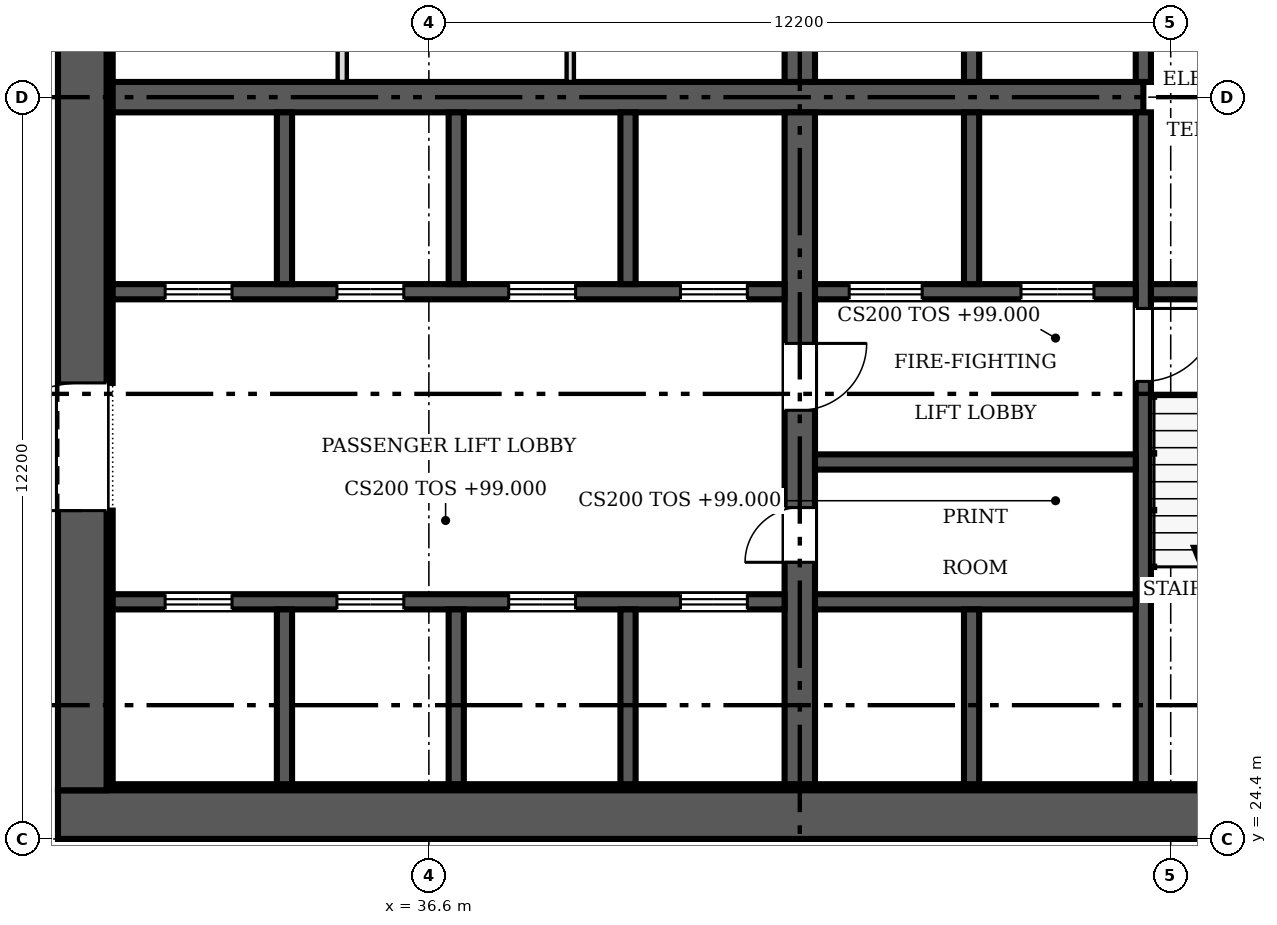
"""IFC4 building model, lengths in metres.
Left out: names, types, materials, properties, quantities, classifications, styles, units other than length and angle.
Written with IfcOpenShell. Run it as: python <this file> out.ifc"""

import sys

from ifc_helpers import new_model, si_unit, direction, frame, frame_2d, origin, place, context, subcontext, project, spatial, rectangle, extrude, source, transform, mapped, element, fill, save


model = new_model("IFC4")
c1 = context("Model", 3, precision=1e-05, world=origin(), true_north=direction((0.0, 1.0)))
c2 = subcontext(c1, "Body", "Model", "MODEL_VIEW")
j1 = project(units=[si_unit("LENGTHUNIT", "METRE"), si_unit("PLANEANGLEUNIT", "RADIAN")], contexts=[c1])
p1 = place(None, origin())
s1 = spatial("IfcSite", under=j1, at=p1, CompositionType="ELEMENT")
p2 = place(p1, origin())
s2 = spatial("IfcBuilding", under=s1, at=p2, CompositionType="ELEMENT")
p3 = place(p2, frame((0.0, 0.0, 99.0)))
s3 = spatial("IfcBuildingStorey", under=s2, at=p3, CompositionType="ELEMENT", Elevation=99.0)
p4 = place(p3, frame((54.9, 24.8, 0.0), z_axis=(0.0, 0.0, 1.0), x_axis=(-1.0, 0.0, 0.0)))
e1 = element("IfcWall", 1, at=p4, inside=s3, PredefinedType="SHEAR", context=c2, shape_type="SweptSolid", body=[
    extrude(rectangle(XDim=24.4, YDim=0.8, at=frame_2d((12.2, 0.0))), origin(), (0.0, 0.0, 1.0), 3.8),
])
m1 = source(origin(), c2, "Body", "SweptSolid", [
    extrude(rectangle(XDim=1.2, YDim=2.1, at=frame_2d((0.6, 1.05))), frame((0.0, 0.41, 0.0), z_axis=(0.0, -1.0, 0.0), x_axis=(1.0, 0.0, 0.0)), (0.0, 0.0, 1.0), 0.82),
])
p5 = place(p4, frame((1.5, 0.0, 0.0)))
e2 = element("IfcOpeningElement", 2, at=p5, cuts=e1, PredefinedType="OPENING", context=c2, shape_type="MappedRepresentation", body=[
    mapped(m1, transform((0.0, 0.0, 0.0), scale=1.0)),
])
p6 = place(p3, frame((30.9, 25.2, 0.0), z_axis=(0.0, 0.0, 1.0), x_axis=(0.0, 1.0, 0.0)))
e3 = element("IfcWall", 3, at=p6, inside=s3, PredefinedType="SHEAR", context=c2, shape_type="SweptSolid", body=[
    extrude(rectangle(XDim=22.8, YDim=0.8, at=frame_2d((11.4, 0.0))), origin(), (0.0, 0.0, 1.0), 3.8),
])
m2 = source(origin(), c2, "Body", "SweptSolid", [
    extrude(rectangle(XDim=2.1, YDim=2.4, at=frame_2d((1.05, 1.2))), frame((0.0, 0.41, 0.0), z_axis=(0.0, -1.0, 0.0), x_axis=(1.0, 0.0, 0.0)), (0.0, 0.0, 1.0), 0.82),
])
p7 = place(p6, frame((4.6, 0.0, 0.0)))
e4 = element("IfcOpeningElement", 4, at=p7, cuts=e3, PredefinedType="OPENING", context=c2, shape_type="MappedRepresentation", body=[
    mapped(m2, transform((0.0, 0.0, 0.0), scale=1.0)),
])
p8 = place(p6, frame((16.1, 0.0, 0.0)))
e5 = element("IfcOpeningElement", 5, at=p8, cuts=e3, PredefinedType="OPENING", context=c2, shape_type="MappedRepresentation", body=[
    mapped(m2, transform((0.0, 0.0, 0.0), scale=1.0)),
])
p9 = place(p3, frame((31.3, 25.25, 0.0), z_axis=(0.0, 0.0, 1.0), x_axis=(1.0, 0.0, 0.0)))
e6 = element("IfcWall", 6, at=p9, inside=s3, PredefinedType="SOLIDWALL", context=c2, shape_type="SweptSolid", body=[
    extrude(rectangle(XDim=20.9, YDim=0.1, at=frame_2d((10.45, 0.0))), origin(), (0.0, 0.0, 1.0), 3.8),
])
p10 = place(p3, frame((31.35, 25.3, 0.0), z_axis=(0.0, 0.0, 1.0), x_axis=(0.0, 1.0, 0.0)))
e7 = element("IfcWall", 7, at=p10, inside=s3, PredefinedType="SOLIDWALL", context=c2, shape_type="SweptSolid", body=[
    extrude(rectangle(XDim=4.5, YDim=0.1, at=frame_2d((2.25, 0.0))), origin(), (0.0, 0.0, 1.0), 3.8),
])
p11 = place(p3, frame((31.35, 31.9, 0.0), z_axis=(0.0, 0.0, 1.0), x_axis=(0.0, 1.0, 0.0)))
e8 = element("IfcWall", 8, at=p11, inside=s3, PredefinedType="SOLIDWALL", context=c2, shape_type="SweptSolid", body=[
    extrude(rectangle(XDim=9.4, YDim=0.1, at=frame_2d((4.7, 0.0))), origin(), (0.0, 0.0, 1.0), 3.8),
])
p12 = place(p3, frame((31.4, 36.6, 0.0), z_axis=(0.0, 0.0, 1.0), x_axis=(1.0, 0.0, 0.0)))
e9 = element("IfcWall", 9, at=p12, inside=s3, PredefinedType="SHEAR", context=c2, shape_type="SweptSolid", body=[
    extrude(rectangle(XDim=16.95, YDim=0.5, at=frame_2d((8.475, 0.0))), origin(), (0.0, 0.0, 1.0), 3.8),
])
p13 = place(p3, frame((42.7, 36.35, 0.0), z_axis=(0.0, 0.0, 1.0), x_axis=(0.0, -1.0, 0.0)))
e10 = element("IfcWall", 10, at=p13, inside=s3, PredefinedType="SHEAR", context=c2, shape_type="SweptSolid", body=[
    extrude(rectangle(XDim=11.05, YDim=0.5, at=frame_2d((5.525, 0.0))), origin(), (0.0, 0.0, 1.0), 3.8),
])
m3 = source(origin(), c2, "Body", "SweptSolid", [
    extrude(rectangle(XDim=0.9, YDim=2.1, at=frame_2d((0.45, 1.05))), frame((0.0, 0.26, 0.0), z_axis=(0.0, -1.0, 0.0), x_axis=(1.0, 0.0, 0.0)), (0.0, 0.0, 1.0), 0.52),
])
p14 = place(p13, frame((6.5, 0.0, 0.0)))
e11 = element("IfcOpeningElement", 11, at=p14, cuts=e10, PredefinedType="OPENING", context=c2, shape_type="MappedRepresentation", body=[
    mapped(m3, transform((0.0, 0.0, 0.0), scale=1.0)),
])
m4 = source(origin(), c2, "Body", "SweptSolid", [
    extrude(rectangle(XDim=1.1, YDim=2.1, at=frame_2d((0.55, 1.05))), frame((0.0, 0.26, 0.0), z_axis=(0.0, -1.0, 0.0), x_axis=(1.0, 0.0, 0.0)), (0.0, 0.0, 1.0), 0.52),
])
p15 = place(p13, frame((3.8, 0.0, 0.0)))
e12 = element("IfcOpeningElement", 12, at=p15, cuts=e10, PredefinedType="OPENING", context=c2, shape_type="MappedRepresentation", body=[
    mapped(m4, transform((0.0, 0.0, 0.0), scale=1.0)),
])
p16 = place(p3, frame((42.7, 36.85, 0.0), z_axis=(0.0, 0.0, 1.0), x_axis=(0.0, 1.0, 0.0)))
e13 = element("IfcWall", 13, at=p16, inside=s3, PredefinedType="SHEAR", context=c2, shape_type="SweptSolid", body=[
    extrude(rectangle(XDim=2.95, YDim=0.5, at=frame_2d((1.475, 0.0))), origin(), (0.0, 0.0, 1.0), 3.8),
])
p17 = place(p3, frame((48.35, 36.35, 0.0), z_axis=(0.0, 0.0, 1.0), x_axis=(0.0, -1.0, 0.0)))
e14 = element("IfcWall", 14, at=p17, inside=s3, PredefinedType="SOLIDWALL", context=c2, shape_type="SweptSolid", body=[
    extrude(rectangle(XDim=11.05, YDim=0.25, at=frame_2d((5.525, 0.0))), origin(), (0.0, 0.0, 1.0), 3.8),
])
m5 = source(origin(), c2, "Body", "SweptSolid", [
    extrude(rectangle(XDim=1.2, YDim=2.1, at=frame_2d((0.6, 1.05))), frame((0.0, 0.135, 0.0), z_axis=(0.0, -1.0, 0.0), x_axis=(1.0, 0.0, 0.0)), (0.0, 0.0, 1.0), 0.27),
])
p18 = place(p17, frame((3.225, 0.0, 0.0)))
e15 = element("IfcOpeningElement", 15, at=p18, cuts=e14, PredefinedType="OPENING", context=c2, shape_type="MappedRepresentation", body=[
    mapped(m5, transform((0.0, 0.0, 0.0), scale=1.0)),
])
p19 = place(p3, frame((48.35, 47.9, 0.0), z_axis=(0.0, 0.0, 1.0), x_axis=(0.0, -1.0, 0.0)))
e16 = element("IfcWall", 16, at=p19, inside=s3, PredefinedType="SOLIDWALL", context=c2, shape_type="SweptSolid", body=[
    extrude(rectangle(XDim=11.05, YDim=0.25, at=frame_2d((5.525, 0.0))), origin(), (0.0, 0.0, 1.0), 3.8),
])
p20 = place(p19, frame((6.625, 0.0, 0.0)))
e17 = element("IfcOpeningElement", 17, at=p20, cuts=e16, PredefinedType="OPENING", context=c2, shape_type="MappedRepresentation", body=[
    mapped(m5, transform((0.0, 0.0, 0.0), scale=1.0)),
])
p21 = place(p3, frame((42.45, 33.4, 0.0), z_axis=(0.0, 0.0, 1.0), x_axis=(-1.0, 0.0, 0.0)))
e18 = element("IfcWall", 18, at=p21, inside=s3, PredefinedType="SOLIDWALL", context=c2, shape_type="SweptSolid", body=[
    extrude(rectangle(XDim=11.05, YDim=0.25, at=frame_2d((5.525, 0.0))), origin(), (0.0, 0.0, 1.0), 3.8),
])
m6 = source(origin(), c2, "Body", "SweptSolid", [
    extrude(rectangle(XDim=1.1, YDim=2.1, at=frame_2d((0.55, 1.05))), frame((0.0, 0.135, 0.0), z_axis=(0.0, -1.0, 0.0), x_axis=(1.0, 0.0, 0.0)), (0.0, 0.0, 1.0), 0.27),
])
p22 = place(p21, frame((9.087, 0.0, 0.0)))
e19 = element("IfcOpeningElement", 19, at=p22, cuts=e18, PredefinedType="OPENING", context=c2, shape_type="MappedRepresentation", body=[
    mapped(m6, transform((0.0, 0.0, 0.0), scale=1.0)),
])
p23 = place(p21, frame((6.262, 0.0, 0.0)))
e20 = element("IfcOpeningElement", 20, at=p23, cuts=e18, PredefinedType="OPENING", context=c2, shape_type="MappedRepresentation", body=[
    mapped(m6, transform((0.0, 0.0, 0.0), scale=1.0)),
])
p24 = place(p21, frame((3.438, 0.0, 0.0)))
e21 = element("IfcOpeningElement", 21, at=p24, cuts=e18, PredefinedType="OPENING", context=c2, shape_type="MappedRepresentation", body=[
    mapped(m6, transform((0.0, 0.0, 0.0), scale=1.0)),
])
p25 = place(p21, frame((0.613, 0.0, 0.0)))
e22 = element("IfcOpeningElement", 22, at=p25, cuts=e18, PredefinedType="OPENING", context=c2, shape_type="MappedRepresentation", body=[
    mapped(m6, transform((0.0, 0.0, 0.0), scale=1.0)),
])
p26 = place(p3, frame((48.225, 33.4, 0.0), z_axis=(0.0, 0.0, 1.0), x_axis=(-1.0, 0.0, 0.0)))
e23 = element("IfcWall", 23, at=p26, inside=s3, PredefinedType="SOLIDWALL", context=c2, shape_type="SweptSolid", body=[
    extrude(rectangle(XDim=5.275, YDim=0.25, at=frame_2d((2.638, 0.0))), origin(), (0.0, 0.0, 1.0), 3.8),
])
p27 = place(p26, frame((3.512, 0.0, 0.0)))
e24 = element("IfcOpeningElement", 24, at=p27, cuts=e23, PredefinedType="OPENING", context=c2, shape_type="MappedRepresentation", body=[
    mapped(m5, transform((0.0, 0.0, 0.0), scale=1.0)),
])
p28 = place(p26, frame((0.688, 0.0, 0.0)))
e25 = element("IfcOpeningElement", 25, at=p28, cuts=e23, PredefinedType="OPENING", context=c2, shape_type="MappedRepresentation", body=[
    mapped(m5, transform((0.0, 0.0, 0.0), scale=1.0)),
])
p29 = place(p3, frame((48.475, 33.4, 0.0), z_axis=(0.0, 0.0, 1.0), x_axis=(1.0, 0.0, 0.0)))
e26 = element("IfcWall", 26, at=p29, inside=s3, PredefinedType="SOLIDWALL", context=c2, shape_type="SweptSolid", body=[
    extrude(rectangle(XDim=3.525, YDim=0.25, at=frame_2d((1.762, 0.0))), origin(), (0.0, 0.0, 1.0), 3.8),
])
p30 = place(p3, frame((31.4, 28.3, 0.0), z_axis=(0.0, 0.0, 1.0), x_axis=(1.0, 0.0, 0.0)))
e27 = element("IfcWall", 27, at=p30, inside=s3, PredefinedType="SOLIDWALL", context=c2, shape_type="SweptSolid", body=[
    extrude(rectangle(XDim=11.05, YDim=0.25, at=frame_2d((5.525, 0.0))), origin(), (0.0, 0.0, 1.0), 3.8),
])
p31 = place(p30, frame((0.863, 0.0, 0.0)))
e28 = element("IfcOpeningElement", 28, at=p31, cuts=e27, PredefinedType="OPENING", context=c2, shape_type="MappedRepresentation", body=[
    mapped(m6, transform((0.0, 0.0, 0.0), scale=1.0)),
])
p32 = place(p30, frame((3.688, 0.0, 0.0)))
e29 = element("IfcOpeningElement", 29, at=p32, cuts=e27, PredefinedType="OPENING", context=c2, shape_type="MappedRepresentation", body=[
    mapped(m6, transform((0.0, 0.0, 0.0), scale=1.0)),
])
p33 = place(p30, frame((6.512, 0.0, 0.0)))
e30 = element("IfcOpeningElement", 30, at=p33, cuts=e27, PredefinedType="OPENING", context=c2, shape_type="MappedRepresentation", body=[
    mapped(m6, transform((0.0, 0.0, 0.0), scale=1.0)),
])
p34 = place(p30, frame((9.337, 0.0, 0.0)))
e31 = element("IfcOpeningElement", 31, at=p34, cuts=e27, PredefinedType="OPENING", context=c2, shape_type="MappedRepresentation", body=[
    mapped(m6, transform((0.0, 0.0, 0.0), scale=1.0)),
])
p35 = place(p3, frame((42.95, 28.3, 0.0), z_axis=(0.0, 0.0, 1.0), x_axis=(1.0, 0.0, 0.0)))
e32 = element("IfcWall", 32, at=p35, inside=s3, PredefinedType="SOLIDWALL", context=c2, shape_type="SweptSolid", body=[
    extrude(rectangle(XDim=5.275, YDim=0.25, at=frame_2d((2.638, 0.0))), origin(), (0.0, 0.0, 1.0), 3.8),
])
p36 = place(p3, frame((45.525, 33.525, 0.0), z_axis=(0.0, 0.0, 1.0), x_axis=(0.0, 1.0, 0.0)))
e33 = element("IfcWall", 33, at=p36, inside=s3, PredefinedType="SOLIDWALL", context=c2, shape_type="SweptSolid", body=[
    extrude(rectangle(XDim=2.825, YDim=0.25, at=frame_2d((1.413, 0.0))), origin(), (0.0, 0.0, 1.0), 3.8),
])
p37 = place(p3, frame((45.525, 36.85, 0.0), z_axis=(0.0, 0.0, 1.0), x_axis=(0.0, 1.0, 0.0)))
e34 = element("IfcWall", 34, at=p37, inside=s3, PredefinedType="SOLIDWALL", context=c2, shape_type="SweptSolid", body=[
    extrude(rectangle(XDim=2.825, YDim=0.25, at=frame_2d((1.413, 0.0))), origin(), (0.0, 0.0, 1.0), 3.8),
])
p38 = place(p3, frame((42.95, 30.6, 0.0), z_axis=(0.0, 0.0, 1.0), x_axis=(1.0, 0.0, 0.0)))
e35 = element("IfcWall", 35, at=p38, inside=s3, PredefinedType="SOLIDWALL", context=c2, shape_type="SweptSolid", body=[
    extrude(rectangle(XDim=5.275, YDim=0.25, at=frame_2d((2.638, 0.0))), origin(), (0.0, 0.0, 1.0), 3.8),
])
for number, where, z_axis, x_axis in (
    (36, (34.225, 33.525, 0.0), (0.0, 0.0, 1.0), (0.0, 1.0, 0.0)),
    (37, (37.05, 33.525, 0.0), (0.0, 0.0, 1.0), (0.0, 1.0, 0.0)),
    (38, (39.875, 33.525, 0.0), (0.0, 0.0, 1.0), (0.0, 1.0, 0.0)),
):
    element("IfcWall", number, at=place(p3, frame(where, z_axis=z_axis, x_axis=x_axis)), inside=s3, PredefinedType="SOLIDWALL", context=c2, shape_type="SweptSolid", body=[
        extrude(rectangle(XDim=2.825, YDim=0.25, at=frame_2d((1.413, 0.0))), origin(), (0.0, 0.0, 1.0), 3.8),
    ])
for number, where, z_axis, x_axis in (
    (39, (34.225, 25.3, 0.0), (0.0, 0.0, 1.0), (0.0, 1.0, 0.0)),
    (40, (37.05, 25.3, 0.0), (0.0, 0.0, 1.0), (0.0, 1.0, 0.0)),
    (41, (39.875, 25.3, 0.0), (0.0, 0.0, 1.0), (0.0, 1.0, 0.0)),
    (42, (45.525, 25.3, 0.0), (0.0, 0.0, 1.0), (0.0, 1.0, 0.0)),
):
    element("IfcWall", number, at=place(p3, frame(where, z_axis=z_axis, x_axis=x_axis)), inside=s3, PredefinedType="SOLIDWALL", context=c2, shape_type="SweptSolid", body=[
        extrude(rectangle(XDim=2.875, YDim=0.25, at=frame_2d((1.438, 0.0))), origin(), (0.0, 0.0, 1.0), 3.8),
    ])
p39 = place(p3, frame((35.175, 36.85, 0.0), z_axis=(0.0, 0.0, 1.0), x_axis=(0.0, 1.0, 0.0)))
e43 = element("IfcWall", 43, at=p39, inside=s3, PredefinedType="PARTITIONING", context=c2, shape_type="SweptSolid", body=[
    extrude(rectangle(XDim=2.875, YDim=0.15, at=frame_2d((1.438, 0.0))), origin(), (0.0, 0.0, 1.0), 3.6),
])
p40 = place(p3, frame((38.925, 36.85, 0.0), z_axis=(0.0, 0.0, 1.0), x_axis=(0.0, 1.0, 0.0)))
e44 = element("IfcWall", 44, at=p40, inside=s3, PredefinedType="PARTITIONING", context=c2, shape_type="SweptSolid", body=[
    extrude(rectangle(XDim=2.89, YDim=0.12, at=frame_2d((1.445, 0.0))), origin(), (0.0, 0.0, 1.0), 3.6),
])
m7 = source(origin(), c2, "Body", "SweptSolid", [
    extrude(rectangle(XDim=2.1, YDim=2.4, at=frame_2d((1.05, 1.2))), frame((0.0, 0.025, 0.0), z_axis=(0.0, -1.0, 0.0), x_axis=(1.0, 0.0, 0.0)), (0.0, 0.0, 1.0), 0.05),
])
p41 = place(p7, origin())
e45 = element("IfcDoor", 45, at=p41, inside=s3, OperationType="DOUBLE_DOOR_SINGLE_SWING", PredefinedType="DOOR", context=c2, shape_type="MappedRepresentation", body=[
    mapped(m7, transform((0.0, 0.0, 0.0), scale=1.0)),
])
fill(e4, e45)
m8 = source(origin(), c2, "Body", "SweptSolid", [
    extrude(rectangle(XDim=0.9, YDim=2.1, at=frame_2d((0.45, 1.05))), frame((0.0, 0.025, 0.0), z_axis=(0.0, -1.0, 0.0), x_axis=(1.0, 0.0, 0.0)), (0.0, 0.0, 1.0), 0.05),
])
p42 = place(p14, origin())
e46 = element("IfcDoor", 46, at=p42, inside=s3, OperationType="SINGLE_SWING_RIGHT", PredefinedType="DOOR", context=c2, shape_type="MappedRepresentation", body=[
    mapped(m8, transform((0.0, 0.0, 0.0), scale=1.0)),
])
fill(e11, e46)
m9 = source(origin(), c2, "Body", "SweptSolid", [
    extrude(rectangle(XDim=1.1, YDim=2.1, at=frame_2d((0.55, 1.05))), frame((0.0, 0.025, 0.0), z_axis=(0.0, -1.0, 0.0), x_axis=(1.0, 0.0, 0.0)), (0.0, 0.0, 1.0), 0.05),
])
p43 = place(p15, origin())
e47 = element("IfcDoor", 47, at=p43, inside=s3, OperationType="SINGLE_SWING_LEFT", PredefinedType="DOOR", context=c2, shape_type="MappedRepresentation", body=[
    mapped(m9, transform((0.0, 0.0, 0.0), scale=1.0)),
])
fill(e12, e47)
m10 = source(origin(), c2, "Body", "SweptSolid", [
    extrude(rectangle(XDim=1.2, YDim=2.1, at=frame_2d((0.6, 1.05))), frame((0.0, 0.025, 0.0), z_axis=(0.0, -1.0, 0.0), x_axis=(1.0, 0.0, 0.0)), (0.0, 0.0, 1.0), 0.05),
])
p44 = place(p18, origin())
e48 = element("IfcDoor", 48, at=p44, inside=s3, OperationType="SINGLE_SWING_LEFT", PredefinedType="DOOR", context=c2, shape_type="MappedRepresentation", body=[
    mapped(m10, transform((0.0, 0.0, 0.0), scale=1.0)),
])
fill(e15, e48)
p45 = place(p22, origin())
e49 = element("IfcDoor", 49, at=p45, inside=s3, OperationType="DOUBLE_DOOR_SLIDING", PredefinedType="DOOR", context=c2, shape_type="MappedRepresentation", body=[
    mapped(m9, transform((0.0, 0.0, 0.0), scale=1.0)),
])
fill(e19, e49)
p46 = place(p23, origin())
e50 = element("IfcDoor", 50, at=p46, inside=s3, OperationType="DOUBLE_DOOR_SLIDING", PredefinedType="DOOR", context=c2, shape_type="MappedRepresentation", body=[
    mapped(m9, transform((0.0, 0.0, 0.0), scale=1.0)),
])
fill(e20, e50)
p47 = place(p24, origin())
e51 = element("IfcDoor", 51, at=p47, inside=s3, OperationType="DOUBLE_DOOR_SLIDING", PredefinedType="DOOR", context=c2, shape_type="MappedRepresentation", body=[
    mapped(m9, transform((0.0, 0.0, 0.0), scale=1.0)),
])
fill(e21, e51)
p48 = place(p25, origin())
e52 = element("IfcDoor", 52, at=p48, inside=s3, OperationType="DOUBLE_DOOR_SLIDING", PredefinedType="DOOR", context=c2, shape_type="MappedRepresentation", body=[
    mapped(m9, transform((0.0, 0.0, 0.0), scale=1.0)),
])
fill(e22, e52)
p49 = place(p27, origin())
e53 = element("IfcDoor", 53, at=p49, inside=s3, OperationType="DOUBLE_DOOR_SLIDING", PredefinedType="DOOR", context=c2, shape_type="MappedRepresentation", body=[
    mapped(m10, transform((0.0, 0.0, 0.0), scale=1.0)),
])
fill(e24, e53)
p50 = place(p28, origin())
e54 = element("IfcDoor", 54, at=p50, inside=s3, OperationType="DOUBLE_DOOR_SLIDING", PredefinedType="DOOR", context=c2, shape_type="MappedRepresentation", body=[
    mapped(m10, transform((0.0, 0.0, 0.0), scale=1.0)),
])
fill(e25, e54)
p51 = place(p31, origin())
e55 = element("IfcDoor", 55, at=p51, inside=s3, OperationType="DOUBLE_DOOR_SLIDING", PredefinedType="DOOR", context=c2, shape_type="MappedRepresentation", body=[
    mapped(m9, transform((0.0, 0.0, 0.0), scale=1.0)),
])
fill(e28, e55)
p52 = place(p32, origin())
e56 = element("IfcDoor", 56, at=p52, inside=s3, OperationType="DOUBLE_DOOR_SLIDING", PredefinedType="DOOR", context=c2, shape_type="MappedRepresentation", body=[
    mapped(m9, transform((0.0, 0.0, 0.0), scale=1.0)),
])
fill(e29, e56)
p53 = place(p33, origin())
e57 = element("IfcDoor", 57, at=p53, inside=s3, OperationType="DOUBLE_DOOR_SLIDING", PredefinedType="DOOR", context=c2, shape_type="MappedRepresentation", body=[
    mapped(m9, transform((0.0, 0.0, 0.0), scale=1.0)),
])
fill(e30, e57)
p54 = place(p34, origin())
e58 = element("IfcDoor", 58, at=p54, inside=s3, OperationType="DOUBLE_DOOR_SLIDING", PredefinedType="DOOR", context=c2, shape_type="MappedRepresentation", body=[
    mapped(m9, transform((0.0, 0.0, 0.0), scale=1.0)),
])
fill(e31, e58)
save(model, sys.argv[1])
